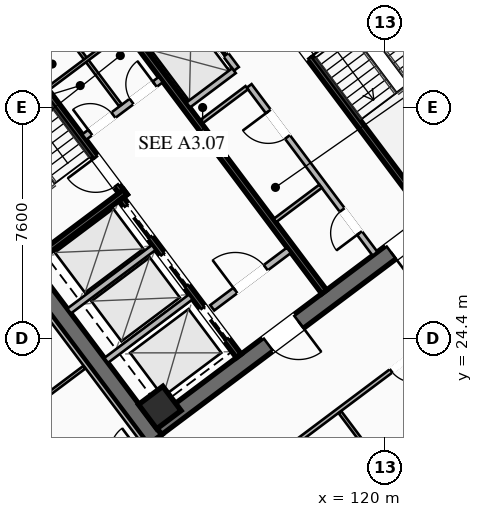
"""IFC4 building model, lengths in metres.
Left out: names, types, materials, properties, quantities, classifications, styles, units other than length and angle.
Written with IfcOpenShell. Run it as: python <this file> out.ifc"""

import sys

from ifc_helpers import new_model, si_unit, direction, frame, frame_2d, origin, origin_2d, place, context, subcontext, project, spatial, rectangle, hollow_rectangle, extrude, element, fill, save


model = new_model("IFC4")
c1 = context("Model", 3, precision=1e-05, world=origin(), true_north=direction((0.0, 1.0)))
c2 = subcontext(c1, "Body", "Model", "MODEL_VIEW")
j1 = project(units=[si_unit("LENGTHUNIT", "METRE"), si_unit("PLANEANGLEUNIT", "RADIAN")], contexts=[c1])
p1 = place(None, origin())
s1 = spatial("IfcSite", under=j1, at=p1, CompositionType="ELEMENT")
p2 = place(p1, origin())
s2 = spatial("IfcBuilding", under=s1, at=p2, CompositionType="ELEMENT")
p3 = place(p2, frame((0.0, 0.0, 188.95)))
s3 = spatial("IfcBuildingStorey", under=s2, at=p3, CompositionType="ELEMENT", Elevation=188.95)
for number, where, z_axis, x_axis in (
    (1, (112.436, 21.077, 0.0), (0.0, 0.0, 1.0), (-0.6, 0.8, 0.0)),
    (2, (115.564, 42.923, 0.0), (0.0, 0.0, 1.0), (0.6, -0.8, 0.0)),
):
    element("IfcWall", number, at=place(p3, frame(where, z_axis=z_axis, x_axis=x_axis)), inside=s3, PredefinedType="SHEAR", context=c2, shape_type="SweptSolid", body=[
        extrude(rectangle(XDim=15.6, YDim=0.55, at=frame_2d((7.8, 0.0))), origin(), (0.0, 0.0, 1.0), 3.55),
    ])
p4 = place(p3, frame((124.539, 30.498, 0.0), z_axis=(0.0, 0.0, 1.0), x_axis=(-0.799998054672, -0.600002593761, 0.0)))
e3 = element("IfcWall", 3, at=p4, inside=s3, PredefinedType="SHEAR", context=c2, shape_type="SweptSolid", body=[
    extrude(rectangle(XDim=15.06, YDim=0.55, at=frame_2d((7.53, 0.0))), origin(), (0.0, 0.0, 1.0), 3.55),
])
p5 = place(p4, frame((9.23, 0.0, 0.0)))
e4 = element("IfcOpeningElement", 4, at=p5, cuts=e3, PredefinedType="OPENING", context=c2, shape_type="SweptSolid", body=[
    extrude(rectangle(XDim=1.25, YDim=2.25, at=frame_2d((0.625, 1.125))), frame((0.0, 0.285, 0.0), z_axis=(0.0, -1.0, 0.0), x_axis=(1.0, 0.0, 0.0)), (0.0, 0.0, 1.0), 0.57),
])
p6 = place(p4, frame((4.18, 0.0, 0.0)))
e5 = element("IfcOpeningElement", 5, at=p6, cuts=e3, PredefinedType="OPENING", context=c2, shape_type="SweptSolid", body=[
    extrude(rectangle(XDim=1.25, YDim=2.25, at=frame_2d((0.625, 1.125))), frame((0.0, 0.285, 0.0), z_axis=(0.0, -1.0, 0.0), x_axis=(1.0, 0.0, 0.0)), (0.0, 0.0, 1.0), 0.57),
])
p7 = place(p3, frame((103.461, 33.502, 0.0), z_axis=(0.0, 0.0, 1.0), x_axis=(0.799998054672, 0.600002593761, 0.0)))
e6 = element("IfcWall", 6, at=p7, inside=s3, PredefinedType="SHEAR", context=c2, shape_type="SweptSolid", body=[
    extrude(rectangle(XDim=15.06, YDim=0.55, at=frame_2d((7.53, 0.0))), origin(), (0.0, 0.0, 1.0), 3.55),
])
p8 = place(p7, frame((4.58, 0.0, 0.0)))
e7 = element("IfcOpeningElement", 7, at=p8, cuts=e6, PredefinedType="OPENING", context=c2, shape_type="SweptSolid", body=[
    extrude(rectangle(XDim=1.25, YDim=2.25, at=frame_2d((0.625, 1.125))), frame((0.0, 0.285, 0.0), z_axis=(0.0, -1.0, 0.0), x_axis=(1.0, 0.0, 0.0)), (0.0, 0.0, 1.0), 0.57),
])
p9 = place(p7, frame((9.63, 0.0, 0.0)))
e8 = element("IfcOpeningElement", 8, at=p9, cuts=e6, PredefinedType="OPENING", context=c2, shape_type="SweptSolid", body=[
    extrude(rectangle(XDim=1.25, YDim=2.25, at=frame_2d((0.625, 1.125))), frame((0.0, 0.285, 0.0), z_axis=(0.0, -1.0, 0.0), x_axis=(1.0, 0.0, 0.0)), (0.0, 0.0, 1.0), 0.57),
])
p10 = place(p3, frame((112.59, 22.13, 0.0), z_axis=(0.0, 0.0, 1.0), x_axis=(0.799999996291, 0.600000004945, 0.0)))
e9 = element("IfcColumn", 9, at=p10, inside=s3, PredefinedType="COLUMN", context=c2, shape_type="SweptSolid", body=[
    extrude(hollow_rectangle(XDim=1.0, YDim=1.0, WallThickness=0.04, at=origin_2d()), origin(), (0.0, 0.0, 1.0), 3.37),
])
p11 = place(p3, frame((111.44, 29.08, 0.0), z_axis=(0.0, 0.0, 1.0), x_axis=(-0.59999029481, 0.8000072788, 0.0)))
e10 = element("IfcWall", 10, at=p11, inside=s3, PredefinedType="SHEAR", context=c2, shape_type="SweptSolid", body=[
    extrude(rectangle(XDim=8.05, YDim=0.2, at=frame_2d((4.025, 0.0))), origin(), (0.0, 0.0, 1.0), 3.37),
])
p12 = place(p11, frame((0.45, 0.0, 0.0)))
e11 = element("IfcOpeningElement", 11, at=p12, cuts=e10, PredefinedType="OPENING", context=c2, shape_type="SweptSolid", body=[
    extrude(rectangle(XDim=1.15, YDim=2.2, at=frame_2d((0.575, 1.1))), frame((0.0, 0.11, 0.0), z_axis=(0.0, -1.0, 0.0), x_axis=(1.0, 0.0, 0.0)), (0.0, 0.0, 1.0), 0.22),
])
p13 = place(p3, frame((108.396, 26.922, 0.0), z_axis=(0.0, 0.0, 1.0), x_axis=(0.800015298837, 0.599979601008, 0.0)))
e12 = element("IfcWall", 12, at=p13, inside=s3, PredefinedType="SHEAR", context=c2, shape_type="SweptSolid", body=[
    extrude(rectangle(XDim=3.83, YDim=0.2, at=frame_2d((1.915, 0.0))), origin(), (0.0, 0.0, 1.0), 3.37),
])
p14 = place(p3, frame((116.56, 34.92, 0.0), z_axis=(0.0, 0.0, 1.0), x_axis=(0.59999029481, -0.8000072788, 0.0)))
e13 = element("IfcWall", 13, at=p14, inside=s3, PredefinedType="SHEAR", context=c2, shape_type="SweptSolid", body=[
    extrude(rectangle(XDim=8.05, YDim=0.2, at=frame_2d((4.025, 0.0))), origin(), (0.0, 0.0, 1.0), 3.37),
])
p15 = place(p14, frame((0.45, 0.0, 0.0)))
e14 = element("IfcOpeningElement", 14, at=p15, cuts=e13, PredefinedType="OPENING", context=c2, shape_type="SweptSolid", body=[
    extrude(rectangle(XDim=1.15, YDim=2.2, at=frame_2d((0.575, 1.1))), frame((0.0, 0.11, 0.0), z_axis=(0.0, -1.0, 0.0), x_axis=(1.0, 0.0, 0.0)), (0.0, 0.0, 1.0), 0.22),
])
p16 = place(p3, frame((117.998, 25.936, 0.0), z_axis=(0.0, 0.0, 1.0), x_axis=(-0.600002693989, 0.799997979501, 0.0)))
e15 = element("IfcWall", 15, at=p16, inside=s3, PredefinedType="SHEAR", context=c2, shape_type="SweptSolid", body=[
    extrude(rectangle(XDim=14.5, YDim=0.2, at=frame_2d((7.25, 0.0))), origin(), (0.0, 0.0, 1.0), 3.37),
])
p17 = place(p3, frame((110.104, 31.028, 0.0), z_axis=(0.0, 0.0, 1.0), x_axis=(0.800018601094, 0.59997519774, 0.0)))
e16 = element("IfcWall", 16, at=p17, inside=s3, PredefinedType="SOLIDWALL", context=c2, shape_type="SweptSolid", body=[
    extrude(rectangle(XDim=3.15, YDim=0.22, at=frame_2d((1.575, 0.0))), origin(), (0.0, 0.0, 1.0), 2.723),
])
p18 = place(p17, frame((0.25, 0.0, 0.0)))
e17 = element("IfcOpeningElement", 17, at=p18, cuts=e16, PredefinedType="OPENING", context=c2, shape_type="SweptSolid", body=[
    extrude(rectangle(XDim=0.95, YDim=2.05, at=frame_2d((0.475, 1.025))), frame((0.0, 0.12, 0.0), z_axis=(0.0, -1.0, 0.0), x_axis=(1.0, 0.0, 0.0)), (0.0, 0.0, 1.0), 0.24),
])
p19 = place(p17, frame((1.95, 0.0, 0.0)))
e18 = element("IfcOpeningElement", 18, at=p19, cuts=e16, PredefinedType="OPENING", context=c2, shape_type="SweptSolid", body=[
    extrude(rectangle(XDim=0.95, YDim=2.05, at=frame_2d((0.475, 1.025))), frame((0.0, 0.12, 0.0), z_axis=(0.0, -1.0, 0.0), x_axis=(1.0, 0.0, 0.0)), (0.0, 0.0, 1.0), 0.24),
])
p20 = place(p3, frame((114.316, 25.412, 0.0), z_axis=(0.0, 0.0, 1.0), x_axis=(0.800018601094, 0.59997519774, 0.0)))
e19 = element("IfcWall", 19, at=p20, inside=s3, PredefinedType="SOLIDWALL", context=c2, shape_type="SweptSolid", body=[
    extrude(rectangle(XDim=3.15, YDim=0.22, at=frame_2d((1.575, 0.0))), origin(), (0.0, 0.0, 1.0), 2.723),
])
p21 = place(p20, frame((0.95, 0.0, 0.0)))
e20 = element("IfcOpeningElement", 20, at=p21, cuts=e19, PredefinedType="OPENING", context=c2, shape_type="SweptSolid", body=[
    extrude(rectangle(XDim=1.25, YDim=2.25, at=frame_2d((0.625, 1.125))), frame((0.0, 0.12, 0.0), z_axis=(0.0, -1.0, 0.0), x_axis=(1.0, 0.0, 0.0)), (0.0, 0.0, 1.0), 0.24),
])
p22 = place(p3, frame((115.19, 23.83, 0.0), z_axis=(0.0, 0.0, 1.0), x_axis=(-0.599993943644, 0.800004542231, 0.0)))
e21 = element("IfcWall", 21, at=p22, inside=s3, PredefinedType="SHEAR", context=c2, shape_type="SweptSolid", body=[
    extrude(rectangle(XDim=6.45, YDim=0.2, at=frame_2d((3.225, 0.0))), origin(), (0.0, 0.0, 1.0), 3.37),
])
p23 = place(p22, frame((4.875, 0.0, 0.0)))
e22 = element("IfcOpeningElement", 22, at=p23, cuts=e21, PredefinedType="OPENING", context=c2, shape_type="SweptSolid", body=[
    extrude(rectangle(XDim=1.3, YDim=2.25, at=frame_2d((0.65, 1.125))), frame((0.0, 0.11, 0.0), z_axis=(0.0, -1.0, 0.0), x_axis=(1.0, 0.0, 0.0)), (0.0, 0.0, 1.0), 0.22),
])
p24 = place(p22, frame((2.875, 0.0, 0.0)))
e23 = element("IfcOpeningElement", 23, at=p24, cuts=e21, PredefinedType="OPENING", context=c2, shape_type="SweptSolid", body=[
    extrude(rectangle(XDim=1.3, YDim=2.25, at=frame_2d((0.65, 1.125))), frame((0.0, 0.11, 0.0), z_axis=(0.0, -1.0, 0.0), x_axis=(1.0, 0.0, 0.0)), (0.0, 0.0, 1.0), 0.22),
])
p25 = place(p22, frame((0.675, 0.0, 0.0)))
e24 = element("IfcOpeningElement", 24, at=p25, cuts=e21, PredefinedType="OPENING", context=c2, shape_type="SweptSolid", body=[
    extrude(rectangle(XDim=1.3, YDim=2.25, at=frame_2d((0.65, 1.125))), frame((0.0, 0.11, 0.0), z_axis=(0.0, -1.0, 0.0), x_axis=(1.0, 0.0, 0.0)), (0.0, 0.0, 1.0), 0.22),
])
for number, where, z_axis, x_axis in (
    (25, (110.826, 23.682, 0.0), (0.0, 0.0, 1.0), (0.8, 0.6, 0.0)),
    (26, (109.608, 25.306, 0.0), (0.0, 0.0, 1.0), (0.8, 0.6, 0.0)),
):
    element("IfcWall", number, at=place(p3, frame(where, z_axis=z_axis, x_axis=x_axis)), inside=s3, PredefinedType="SOLIDWALL", context=c2, shape_type="SweptSolid", body=[
        extrude(rectangle(XDim=3.48, YDim=0.2, at=frame_2d((1.74, 0.0))), origin(), (0.0, 0.0, 1.0), 3.37),
    ])
p26 = place(p3, frame((111.296, 32.072, 0.0), z_axis=(0.0, 0.0, 1.0), x_axis=(-0.59995887973, 0.800030838552, 0.0)))
e27 = element("IfcWall", 27, at=p26, inside=s3, PredefinedType="PARTITIONING", context=c2, shape_type="SweptSolid", body=[
    extrude(rectangle(XDim=3.8, YDim=0.11, at=frame_2d((1.9, 0.0))), origin(), (0.0, 0.0, 1.0), 2.723),
])
p27 = place(p3, frame((108.91, 32.62, 0.0), z_axis=(0.0, 0.0, 1.0), x_axis=(0.800018601094, 0.59997519774, 0.0)))
e28 = element("IfcWall", 28, at=p27, inside=s3, PredefinedType="PARTITIONING", context=c2, shape_type="SweptSolid", body=[
    extrude(rectangle(XDim=3.15, YDim=0.11, at=frame_2d((1.575, 0.0))), origin(), (0.0, 0.0, 1.0), 2.723),
])
p28 = place(p3, frame((119.67, 27.19, 0.0), z_axis=(0.0, 0.0, 1.0), x_axis=(-0.599988677396, 0.800008491828, 0.0)))
e29 = element("IfcWall", 29, at=p28, inside=s3, PredefinedType="SOLIDWALL", context=c2, shape_type="SweptSolid", body=[
    extrude(rectangle(XDim=6.9, YDim=0.2, at=frame_2d((3.45, 0.0))), origin(), (0.0, 0.0, 1.0), 2.723),
])
p29 = place(p28, frame((0.85, 0.0, 0.0)))
e30 = element("IfcOpeningElement", 30, at=p29, cuts=e29, PredefinedType="OPENING", context=c2, shape_type="SweptSolid", body=[
    extrude(rectangle(XDim=0.95, YDim=2.05, at=frame_2d((0.475, 1.025))), frame((0.0, 0.11, 0.0), z_axis=(0.0, -1.0, 0.0), x_axis=(1.0, 0.0, 0.0)), (0.0, 0.0, 1.0), 0.22),
])
p30 = place(p28, frame((4.8, 0.0, 0.0)))
e31 = element("IfcOpeningElement", 31, at=p30, cuts=e29, PredefinedType="OPENING", context=c2, shape_type="SweptSolid", body=[
    extrude(rectangle(XDim=1.05, YDim=2.2, at=frame_2d((0.525, 1.1))), frame((0.0, 0.11, 0.0), z_axis=(0.0, -1.0, 0.0), x_axis=(1.0, 0.0, 0.0)), (0.0, 0.0, 1.0), 0.22),
])
for number, where, z_axis, x_axis in (
    (32, (113.946, 31.522, 0.0), (0.0, 0.0, 1.0), (0.8, 0.6, 0.0)),
    (33, (116.376, 28.282, 0.0), (0.0, 0.0, 1.0), (0.8, 0.6, 0.0)),
):
    element("IfcWall", number, at=place(p3, frame(where, z_axis=z_axis, x_axis=x_axis)), inside=s3, PredefinedType="PARTITIONING", context=c2, shape_type="SweptSolid", body=[
        extrude(rectangle(XDim=1.88, YDim=0.135, at=frame_2d((0.94, 0.0))), origin(), (0.0, 0.0, 1.0), 2.723),
    ])
p31 = place(p3, frame((115.11, 33.27, 0.0), z_axis=(0.0, 0.0, 1.0), x_axis=(-0.600011322243, 0.799991508192, 0.0)))
e34 = element("IfcWall", 34, at=p31, inside=s3, PredefinedType="SOLIDWALL", context=c2, shape_type="SweptSolid", body=[
    extrude(rectangle(XDim=6.9, YDim=0.2, at=frame_2d((3.45, 0.0))), origin(), (0.0, 0.0, 1.0), 3.37),
])
p32 = place(p31, frame((0.575, 0.0, 0.0)))
e35 = element("IfcOpeningElement", 35, at=p32, cuts=e34, PredefinedType="OPENING", context=c2, shape_type="SweptSolid", body=[
    extrude(rectangle(XDim=1.1, YDim=2.2, at=frame_2d((0.55, 1.1))), frame((0.0, 0.11, 0.0), z_axis=(0.0, -1.0, 0.0), x_axis=(1.0, 0.0, 0.0)), (0.0, 0.0, 1.0), 0.22),
])
p33 = place(p31, frame((2.825, 0.0, 0.0)))
e36 = element("IfcOpeningElement", 36, at=p33, cuts=e34, PredefinedType="OPENING", context=c2, shape_type="SweptSolid", body=[
    extrude(rectangle(XDim=1.1, YDim=2.2, at=frame_2d((0.55, 1.1))), frame((0.0, 0.11, 0.0), z_axis=(0.0, -1.0, 0.0), x_axis=(1.0, 0.0, 0.0)), (0.0, 0.0, 1.0), 0.22),
])
p34 = place(p31, frame((5.075, 0.0, 0.0)))
e37 = element("IfcOpeningElement", 37, at=p34, cuts=e34, PredefinedType="OPENING", context=c2, shape_type="SweptSolid", body=[
    extrude(rectangle(XDim=1.1, YDim=2.2, at=frame_2d((0.55, 1.1))), frame((0.0, 0.11, 0.0), z_axis=(0.0, -1.0, 0.0), x_axis=(1.0, 0.0, 0.0)), (0.0, 0.0, 1.0), 0.22),
])
p35 = place(p3, frame((113.526, 32.082, 0.0), z_axis=(0.0, 0.0, 1.0), x_axis=(0.800046745961, 0.599937666993, 0.0)))
e38 = element("IfcWall", 38, at=p35, inside=s3, PredefinedType="SOLIDWALL", context=c2, shape_type="SweptSolid", body=[
    extrude(rectangle(XDim=1.88, YDim=0.2, at=frame_2d((0.94, 0.0))), origin(), (0.0, 0.0, 1.0), 3.37),
])
p36 = place(p3, frame((112.176, 33.882, 0.0), z_axis=(0.0, 0.0, 1.0), x_axis=(0.8, 0.6, 0.0)))
e39 = element("IfcWall", 39, at=p36, inside=s3, PredefinedType="SOLIDWALL", context=c2, shape_type="SweptSolid", body=[
    extrude(rectangle(XDim=1.88, YDim=0.2, at=frame_2d((0.94, 0.0))), origin(), (0.0, 0.0, 1.0), 3.37),
])
p37 = place(p3, frame((95.638, 32.566, 0.0), z_axis=(0.0, 0.0, 1.0), x_axis=(0.8, 0.6, 0.0)))
e40 = element("IfcWall", 40, at=p37, inside=s3, PredefinedType="PARTITIONING", context=c2, shape_type="SweptSolid", body=[
    extrude(rectangle(XDim=28.7, YDim=0.135, at=frame_2d((14.35, 0.0))), origin(), (0.0, 0.0, 1.0), 2.723),
])
p38 = place(p37, frame((0.3, 0.0, 0.0)))
e41 = element("IfcOpeningElement", 41, at=p38, cuts=e40, PredefinedType="OPENING", context=c2, shape_type="SweptSolid", body=[
    extrude(rectangle(XDim=0.95, YDim=2.05, at=frame_2d((0.475, 1.025))), frame((0.0, 0.077, 0.0), z_axis=(0.0, -1.0, 0.0), x_axis=(1.0, 0.0, 0.0)), (0.0, 0.0, 1.0), 0.155),
])
p39 = place(p37, frame((14.083, 0.0, 0.0)))
e42 = element("IfcOpeningElement", 42, at=p39, cuts=e40, PredefinedType="OPENING", context=c2, shape_type="SweptSolid", body=[
    extrude(rectangle(XDim=0.95, YDim=2.05, at=frame_2d((0.475, 1.025))), frame((0.0, 0.077, 0.0), z_axis=(0.0, -1.0, 0.0), x_axis=(1.0, 0.0, 0.0)), (0.0, 0.0, 1.0), 0.155),
])
p40 = place(p37, frame((27.45, 0.0, 0.0)))
e43 = element("IfcOpeningElement", 43, at=p40, cuts=e40, PredefinedType="OPENING", context=c2, shape_type="SweptSolid", body=[
    extrude(rectangle(XDim=0.95, YDim=2.05, at=frame_2d((0.475, 1.025))), frame((0.0, 0.077, 0.0), z_axis=(0.0, -1.0, 0.0), x_axis=(1.0, 0.0, 0.0)), (0.0, 0.0, 1.0), 0.155),
])
p41 = place(p3, frame((131.87, 32.09, 0.0), z_axis=(0.0, 0.0, 1.0), x_axis=(-0.800003062365, -0.599995916825, 0.0)))
e44 = element("IfcWall", 44, at=p41, inside=s3, PredefinedType="PARTITIONING", context=c2, shape_type="SweptSolid", body=[
    extrude(rectangle(XDim=28.7, YDim=0.135, at=frame_2d((14.35, 0.0))), origin(), (0.0, 0.0, 1.0), 2.723),
])
p42 = place(p41, frame((27.37, 0.0, 0.0)))
e45 = element("IfcOpeningElement", 45, at=p42, cuts=e44, PredefinedType="OPENING", context=c2, shape_type="SweptSolid", body=[
    extrude(rectangle(XDim=0.95, YDim=2.05, at=frame_2d((0.475, 1.025))), frame((0.0, 0.077, 0.0), z_axis=(0.0, -1.0, 0.0), x_axis=(1.0, 0.0, 0.0)), (0.0, 0.0, 1.0), 0.155),
])
p43 = place(p41, frame((13.638, 0.0, 0.0)))
e46 = element("IfcOpeningElement", 46, at=p43, cuts=e44, PredefinedType="OPENING", context=c2, shape_type="SweptSolid", body=[
    extrude(rectangle(XDim=0.95, YDim=2.05, at=frame_2d((0.475, 1.025))), frame((0.0, 0.077, 0.0), z_axis=(0.0, -1.0, 0.0), x_axis=(1.0, 0.0, 0.0)), (0.0, 0.0, 1.0), 0.155),
])
p44 = place(p41, frame((0.38, 0.0, 0.0)))
e47 = element("IfcOpeningElement", 47, at=p44, cuts=e44, PredefinedType="OPENING", context=c2, shape_type="SweptSolid", body=[
    extrude(rectangle(XDim=0.95, YDim=2.05, at=frame_2d((0.475, 1.025))), frame((0.0, 0.077, 0.0), z_axis=(0.0, -1.0, 0.0), x_axis=(1.0, 0.0, 0.0)), (0.0, 0.0, 1.0), 0.155),
])
p45 = place(p3, frame((122.148, 17.136, 0.0), z_axis=(0.0, 0.0, 1.0), x_axis=(-0.599980629989, 0.800014527142, 0.0)))
e48 = element("IfcWall", 48, at=p45, inside=s3, PredefinedType="PARTITIONING", context=c2, shape_type="SweptSolid", body=[
    extrude(rectangle(XDim=6.05, YDim=0.11, at=frame_2d((3.025, 0.0))), origin(), (0.0, 0.0, 1.0), 2.723),
])
p46 = place(p3, frame((112.104, 20.928, 0.0), z_axis=(0.0, 0.0, 1.0), x_axis=(-0.599994940075, 0.800003794918, 0.0)))
e49 = element("IfcWall", 49, at=p46, inside=s3, PredefinedType="PARTITIONING", context=c2, shape_type="SweptSolid", body=[
    extrude(rectangle(XDim=15.44, YDim=0.135, at=frame_2d((7.72, 0.0))), origin(), (0.0, 0.0, 1.0), 2.723),
])
p47 = place(p3, frame((103.276, 18.332, 0.0), z_axis=(0.0, 0.0, 1.0), x_axis=(0.8, 0.6, 0.0)))
e50 = element("IfcWall", 50, at=p47, inside=s3, PredefinedType="PARTITIONING", context=c2, shape_type="SweptSolid", body=[
    extrude(rectangle(XDim=8.54, YDim=0.11, at=frame_2d((4.27, 0.0))), origin(), (0.0, 0.0, 1.0), 2.723),
])
p48 = place(p5, origin())
e51 = element("IfcDoor", 51, at=p48, inside=s3, OperationType="SINGLE_SWING_LEFT", PredefinedType="DOOR", context=c2, shape_type="SweptSolid", body=[
    extrude(rectangle(XDim=1.25, YDim=2.25, at=frame_2d((0.625, 1.125))), frame((0.0, 0.025, 0.0), z_axis=(0.0, -1.0, 0.0), x_axis=(1.0, 0.0, 0.0)), (0.0, 0.0, 1.0), 0.05),
])
fill(e4, e51)
p49 = place(p6, origin())
e52 = element("IfcDoor", 52, at=p49, inside=s3, OperationType="SINGLE_SWING_RIGHT", PredefinedType="DOOR", context=c2, shape_type="SweptSolid", body=[
    extrude(rectangle(XDim=1.25, YDim=2.25, at=frame_2d((0.625, 1.125))), frame((0.0, 0.025, 0.0), z_axis=(0.0, -1.0, 0.0), x_axis=(1.0, 0.0, 0.0)), (0.0, 0.0, 1.0), 0.05),
])
fill(e5, e52)
p50 = place(p12, origin())
e53 = element("IfcDoor", 53, at=p50, inside=s3, OperationType="SINGLE_SWING_RIGHT", PredefinedType="DOOR", context=c2, shape_type="SweptSolid", body=[
    extrude(rectangle(XDim=1.15, YDim=2.2, at=frame_2d((0.575, 1.1))), frame((0.0, 0.025, 0.0), z_axis=(0.0, -1.0, 0.0), x_axis=(1.0, 0.0, 0.0)), (0.0, 0.0, 1.0), 0.05),
])
fill(e11, e53)
p51 = place(p15, origin())
e54 = element("IfcDoor", 54, at=p51, inside=s3, OperationType="SINGLE_SWING_RIGHT", PredefinedType="DOOR", context=c2, shape_type="SweptSolid", body=[
    extrude(rectangle(XDim=1.15, YDim=2.2, at=frame_2d((0.575, 1.1))), frame((0.0, 0.025, 0.0), z_axis=(0.0, -1.0, 0.0), x_axis=(1.0, 0.0, 0.0)), (0.0, 0.0, 1.0), 0.05),
])
fill(e14, e54)
p52 = place(p21, origin())
e55 = element("IfcDoor", 55, at=p52, inside=s3, OperationType="SINGLE_SWING_LEFT", PredefinedType="DOOR", context=c2, shape_type="SweptSolid", body=[
    extrude(rectangle(XDim=1.25, YDim=2.25, at=frame_2d((0.625, 1.125))), frame((0.0, 0.025, 0.0), z_axis=(0.0, -1.0, 0.0), x_axis=(1.0, 0.0, 0.0)), (0.0, 0.0, 1.0), 0.05),
])
fill(e20, e55)
p53 = place(p18, origin())
e56 = element("IfcDoor", 56, at=p53, inside=s3, OperationType="SINGLE_SWING_LEFT", PredefinedType="DOOR", context=c2, shape_type="SweptSolid", body=[
    extrude(rectangle(XDim=0.95, YDim=2.05, at=frame_2d((0.475, 1.025))), frame((0.0, 0.025, 0.0), z_axis=(0.0, -1.0, 0.0), x_axis=(1.0, 0.0, 0.0)), (0.0, 0.0, 1.0), 0.05),
])
fill(e17, e56)
p54 = place(p19, origin())
e57 = element("IfcDoor", 57, at=p54, inside=s3, OperationType="SINGLE_SWING_RIGHT", PredefinedType="DOOR", context=c2, shape_type="SweptSolid", body=[
    extrude(rectangle(XDim=0.95, YDim=2.05, at=frame_2d((0.475, 1.025))), frame((0.0, 0.025, 0.0), z_axis=(0.0, -1.0, 0.0), x_axis=(1.0, 0.0, 0.0)), (0.0, 0.0, 1.0), 0.05),
])
fill(e18, e57)
p55 = place(p29, origin())
e58 = element("IfcDoor", 58, at=p55, inside=s3, OperationType="SINGLE_SWING_LEFT", PredefinedType="DOOR", context=c2, shape_type="SweptSolid", body=[
    extrude(rectangle(XDim=0.95, YDim=2.05, at=frame_2d((0.475, 1.025))), frame((0.0, 0.025, 0.0), z_axis=(0.0, -1.0, 0.0), x_axis=(1.0, 0.0, 0.0)), (0.0, 0.0, 1.0), 0.05),
])
fill(e30, e58)
p56 = place(p30, origin())
e59 = element("IfcDoor", 59, at=p56, inside=s3, OperationType="SINGLE_SWING_RIGHT", PredefinedType="DOOR", context=c2, shape_type="SweptSolid", body=[
    extrude(rectangle(XDim=1.05, YDim=2.2, at=frame_2d((0.525, 1.1))), frame((0.0, 0.025, 0.0), z_axis=(0.0, -1.0, 0.0), x_axis=(1.0, 0.0, 0.0)), (0.0, 0.0, 1.0), 0.05),
])
fill(e31, e59)
p57 = place(p43, origin())
e60 = element("IfcDoor", 60, at=p57, inside=s3, OperationType="SINGLE_SWING_LEFT", PredefinedType="DOOR", context=c2, shape_type="SweptSolid", body=[
    extrude(rectangle(XDim=0.95, YDim=2.05, at=frame_2d((0.475, 1.025))), frame((0.0, 0.025, 0.0), z_axis=(0.0, -1.0, 0.0), x_axis=(1.0, 0.0, 0.0)), (0.0, 0.0, 1.0), 0.05),
])
fill(e46, e60)
p58 = place(p23, origin())
e61 = element("IfcDoor", 61, at=p58, inside=s3, OperationType="SLIDING_TO_LEFT", PredefinedType="DOOR", context=c2, shape_type="SweptSolid", body=[
    extrude(rectangle(XDim=1.3, YDim=2.25, at=frame_2d((0.65, 1.125))), frame((0.0, 0.025, 0.0), z_axis=(0.0, -1.0, 0.0), x_axis=(1.0, 0.0, 0.0)), (0.0, 0.0, 1.0), 0.05),
])
fill(e22, e61)
p59 = place(p24, origin())
e62 = element("IfcDoor", 62, at=p59, inside=s3, OperationType="SLIDING_TO_LEFT", PredefinedType="DOOR", context=c2, shape_type="SweptSolid", body=[
    extrude(rectangle(XDim=1.3, YDim=2.25, at=frame_2d((0.65, 1.125))), frame((0.0, 0.025, 0.0), z_axis=(0.0, -1.0, 0.0), x_axis=(1.0, 0.0, 0.0)), (0.0, 0.0, 1.0), 0.05),
])
fill(e23, e62)
p60 = place(p25, origin())
e63 = element("IfcDoor", 63, at=p60, inside=s3, OperationType="SLIDING_TO_LEFT", PredefinedType="DOOR", context=c2, shape_type="SweptSolid", body=[
    extrude(rectangle(XDim=1.3, YDim=2.25, at=frame_2d((0.65, 1.125))), frame((0.0, 0.025, 0.0), z_axis=(0.0, -1.0, 0.0), x_axis=(1.0, 0.0, 0.0)), (0.0, 0.0, 1.0), 0.05),
])
fill(e24, e63)
p61 = place(p32, origin())
e64 = element("IfcDoor", 64, at=p61, inside=s3, OperationType="SLIDING_TO_LEFT", PredefinedType="DOOR", context=c2, shape_type="SweptSolid", body=[
    extrude(rectangle(XDim=1.1, YDim=2.2, at=frame_2d((0.55, 1.1))), frame((0.0, 0.025, 0.0), z_axis=(0.0, -1.0, 0.0), x_axis=(1.0, 0.0, 0.0)), (0.0, 0.0, 1.0), 0.05),
])
fill(e35, e64)
save(model, sys.argv[1])
